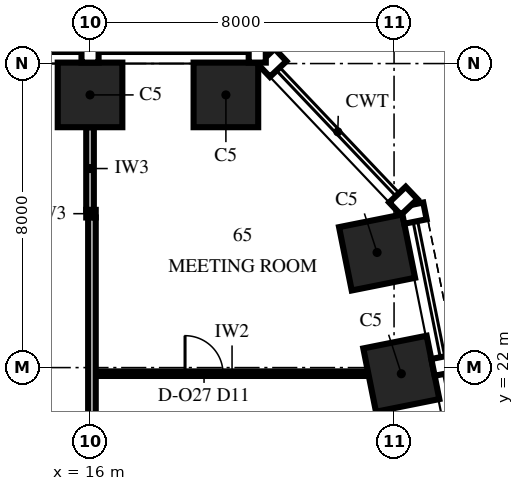
"""IFC4 building model, lengths in metres.
Left out: names, types, materials, properties, quantities, classifications, styles, units other than length and angle.
Written with IfcOpenShell. Run it as: python <this file> out.ifc"""

import sys

from ifc_helpers import new_model, si_unit, direction, frame, frame_2d, origin, origin_2d, place, context, subcontext, project, spatial, rectangle, extrude, element, fill, save


model = new_model("IFC4")
c1 = context("Model", 3, precision=1e-05, world=origin(), true_north=direction((0.0, 1.0)))
c2 = subcontext(c1, "Body", "Model", "MODEL_VIEW")
j1 = project(units=[si_unit("LENGTHUNIT", "METRE"), si_unit("PLANEANGLEUNIT", "RADIAN")], contexts=[c1])
p1 = place(None, origin())
s1 = spatial("IfcSite", under=j1, at=p1, CompositionType="ELEMENT")
p2 = place(p1, origin())
s2 = spatial("IfcBuilding", under=s1, at=p2, CompositionType="ELEMENT")
p3 = place(p2, frame((0.0, 0.0, 248.0)))
s3 = spatial("IfcBuildingStorey", under=s2, at=p3, CompositionType="ELEMENT", Elevation=248.0)
for number, where, z_axis, x_axis in (
    (1, (24.191, 21.838, 0.0), (0.0, 0.0, 1.0), (-0.196, 0.981, 0.0)),
    (2, (23.553, 25.029, 0.0), (0.0, 0.0, 1.0), (-0.196, 0.981, 0.0)),
    (3, (19.575, 29.175, 0.0), (0.0, 0.0, 1.0), (-1.0, 0.0, 0.0)),
    (4, (16.0, 29.175, 0.0), (0.0, 0.0, 1.0), (-1.0, 0.0, 0.0)),
):
    element("IfcColumn", number, at=place(p3, frame(where, z_axis=z_axis, x_axis=x_axis)), inside=s3, PredefinedType="COLUMN", context=c2, shape_type="SweptSolid", body=[
        extrude(rectangle(XDim=1.7, YDim=1.7, at=origin_2d()), origin(), (0.0, 0.0, 1.0), 4.0),
    ])
p4 = place(p3, frame((16.15, 21.84, 0.0), z_axis=(0.0, 0.0, 1.0), x_axis=(1.0, 0.0, 0.0)))
e5 = element("IfcWall", 5, at=p4, inside=s3, PredefinedType="PARTITIONING", context=c2, shape_type="SweptSolid", body=[
    extrude(rectangle(XDim=7.174, YDim=0.12, at=frame_2d((3.587, 0.0))), origin(), (0.0, 0.0, 1.0), 3.23),
])
p5 = place(p4, frame((2.35, 0.0, 0.0)))
e6 = element("IfcOpeningElement", 6, at=p5, cuts=e5, PredefinedType="OPENING", context=c2, shape_type="SweptSolid", body=[
    extrude(rectangle(XDim=1.0, YDim=2.4, at=frame_2d((0.5, 1.2))), frame((0.0, 0.075, 0.0), z_axis=(0.0, -1.0, 0.0), x_axis=(1.0, 0.0, 0.0)), (0.0, 0.0, 1.0), 0.15),
])
p6 = place(p3, frame((15.9, 26.05, 0.0), z_axis=(0.0, 0.0, 1.0), x_axis=(1.0, 0.0, 0.0)))
e7 = element("IfcWall", 7, at=p6, inside=s3, PredefinedType="PARTITIONING", context=c2, shape_type="SweptSolid", body=[
    extrude(rectangle(XDim=0.25, YDim=0.2, at=frame_2d((0.125, 0.0))), origin(), (0.0, 0.0, 1.0), 3.418),
])
p7 = place(p3, frame((16.0, 26.15, 0.0), z_axis=(0.0, 0.0, 1.0), x_axis=(0.0, 1.0, 0.0)))
e8 = element("IfcWall", 8, at=p7, inside=s3, PredefinedType="PARTITIONING", context=c2, shape_type="SweptSolid", body=[
    extrude(rectangle(XDim=2.175, YDim=0.2, at=frame_2d((1.087, 0.0))), origin(), (0.0, 0.0, 1.0), 3.418),
])
p8 = place(p3, frame((16.05, 1.94, 0.0), z_axis=(0.0, 0.0, 1.0), x_axis=(0.0, 1.0, 0.0)))
e9 = element("IfcWall", 9, at=p8, inside=s3, PredefinedType="PARTITIONING", context=c2, shape_type="SweptSolid", body=[
    extrude(rectangle(XDim=24.01, YDim=0.2, at=frame_2d((12.005, 0.0))), origin(), (0.0, 0.0, 1.0), 2.842),
])
p9 = place(p8, frame((8.46, 0.0, 0.0)))
e10 = element("IfcOpeningElement", 10, at=p9, cuts=e9, PredefinedType="OPENING", context=c2, shape_type="SweptSolid", body=[
    extrude(rectangle(XDim=1.2, YDim=2.4, at=frame_2d((0.6, 1.2))), frame((0.0, 0.115, 0.0), z_axis=(0.0, -1.0, 0.0), x_axis=(1.0, 0.0, 0.0)), (0.0, 0.0, 1.0), 0.23),
])
p10 = place(p5, origin())
e11 = element("IfcDoor", 11, at=p10, inside=s3, OperationType="SINGLE_SWING_RIGHT", PredefinedType="DOOR", context=c2, shape_type="SweptSolid", body=[
    extrude(rectangle(XDim=1.0, YDim=2.4, at=frame_2d((0.5, 1.2))), frame((0.0, 0.06, 0.0), z_axis=(0.0, -1.0, 0.0), x_axis=(1.0, 0.0, 0.0)), (0.0, 0.0, 1.0), 0.12),
])
fill(e6, e11)
save(model, sys.argv[1])
